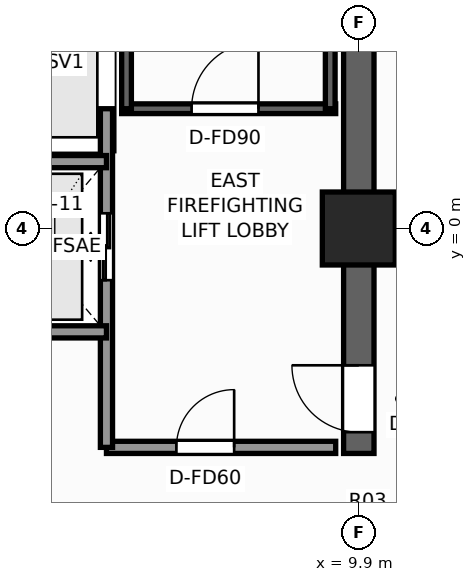
"""IFC4 building model, lengths in metres.
Left out: names, types, materials, properties, quantities, classifications, styles, units other than length and angle.
Written with IfcOpenShell. Run it as: python <this file> out.ifc"""

import sys

from ifc_helpers import new_model, si_unit, direction, frame, frame_2d, origin, origin_2d, place, context, subcontext, project, spatial, rectangle, extrude, element, fill, save


model = new_model("IFC4")
c1 = context("Model", 3, precision=1e-05, world=origin(), true_north=direction((0.0, 1.0)))
c2 = subcontext(c1, "Body", "Model", "MODEL_VIEW")
j1 = project(units=[si_unit("LENGTHUNIT", "METRE"), si_unit("PLANEANGLEUNIT", "RADIAN")], contexts=[c1])
p1 = place(None, origin())
s1 = spatial("IfcSite", under=j1, at=p1, CompositionType="ELEMENT")
p2 = place(p1, origin())
s2 = spatial("IfcBuilding", under=s1, at=p2, CompositionType="ELEMENT")
p3 = place(p2, frame((0.0, 0.0, 166.8)))
s3 = spatial("IfcBuildingStorey", under=s2, at=p3, CompositionType="ELEMENT", Elevation=166.8)
p4 = place(p3, frame((9.9, -3.7, 0.0), z_axis=(0.0, 0.0, 1.0), x_axis=(0.0, 1.0, 0.0)))
e1 = element("IfcWall", 1, at=p4, inside=s3, PredefinedType="SHEAR", context=c2, shape_type="SweptSolid", body=[
    extrude(rectangle(XDim=13.35, YDim=0.5, at=frame_2d((6.675, 0.0))), origin(), (0.0, 0.0, 1.0), 3.3),
])
p5 = place(p4, frame((0.35, 0.0, 0.0)))
e2 = element("IfcOpeningElement", 2, at=p5, cuts=e1, PredefinedType="OPENING", context=c2, shape_type="SweptSolid", body=[
    extrude(rectangle(XDim=1.1, YDim=2.2, at=frame_2d((0.55, 1.1))), frame((0.0, 0.26, 0.0), z_axis=(0.0, -1.0, 0.0), x_axis=(1.0, 0.0, 0.0)), (0.0, 0.0, 1.0), 0.52),
])
p6 = place(p3, frame((9.9, 0.0, 0.0), z_axis=(0.0, 0.0, 1.0), x_axis=(1.0, 0.0, 0.0)))
e3 = element("IfcColumn", 3, at=p6, inside=s3, PredefinedType="COLUMN", context=c2, shape_type="SweptSolid", body=[
    extrude(rectangle(XDim=1.2, YDim=1.2, at=origin_2d()), origin(), (0.0, 0.0, 1.0), 3.3),
])
p7 = place(p3, frame((6.0, 1.97, 0.0), z_axis=(0.0, 0.0, 1.0), x_axis=(1.0, 0.0, 0.0)))
e4 = element("IfcWall", 4, at=p7, inside=s3, PredefinedType="SHEAR", context=c2, shape_type="SweptSolid", body=[
    extrude(rectangle(XDim=3.52, YDim=0.16, at=frame_2d((1.76, 0.0))), origin(), (0.0, 0.0, 1.0), 3.3),
])
p8 = place(p7, frame((1.15, 0.0, 0.0)))
e5 = element("IfcOpeningElement", 5, at=p8, cuts=e4, PredefinedType="OPENING", context=c2, shape_type="SweptSolid", body=[
    extrude(rectangle(XDim=1.1, YDim=2.2, at=frame_2d((0.55, 1.1))), frame((0.0, 0.09, 0.0), z_axis=(0.0, -1.0, 0.0), x_axis=(1.0, 0.0, 0.0)), (0.0, 0.0, 1.0), 0.18),
])
for number, where, z_axis, x_axis in (
    (6, (6.08, 1.97, 0.0), (0.0, 0.0, 1.0), (0.0, 1.0, 0.0)),
    (7, (9.43, 1.97, 0.0), (0.0, 0.0, 1.0), (0.0, 1.0, 0.0)),
):
    element("IfcWall", number, at=place(p3, frame(where, z_axis=z_axis, x_axis=x_axis)), inside=s3, PredefinedType="SHEAR", context=c2, shape_type="SweptSolid", body=[
        extrude(rectangle(XDim=7.56, YDim=0.16, at=frame_2d((3.78, 0.0))), origin(), (0.0, 0.0, 1.0), 3.3),
    ])
p9 = place(p3, frame((5.75, -3.6, 0.0), z_axis=(0.0, 0.0, 1.0), x_axis=(1.0, 0.0, 0.0)))
e8 = element("IfcWall", 8, at=p9, inside=s3, PredefinedType="SOLIDWALL", context=c2, shape_type="SweptSolid", body=[
    extrude(rectangle(XDim=3.77, YDim=0.2, at=frame_2d((1.885, 0.0))), origin(), (0.0, 0.0, 1.0), 3.1),
])
p10 = place(p9, frame((1.15, 0.0, 0.0)))
e9 = element("IfcOpeningElement", 9, at=p10, cuts=e8, PredefinedType="OPENING", context=c2, shape_type="SweptSolid", body=[
    extrude(rectangle(XDim=0.95, YDim=2.06, at=frame_2d((0.475, 1.03))), frame((0.0, 0.11, 0.0), z_axis=(0.0, -1.0, 0.0), x_axis=(1.0, 0.0, 0.0)), (0.0, 0.0, 1.0), 0.22),
])
p11 = place(p3, frame((5.75, -3.6, 0.0), z_axis=(0.0, 0.0, 1.0), x_axis=(0.0, 1.0, 0.0)))
e10 = element("IfcWall", 10, at=p11, inside=s3, PredefinedType="SOLIDWALL", context=c2, shape_type="SweptSolid", body=[
    extrude(rectangle(XDim=5.57, YDim=0.2, at=frame_2d((2.785, 0.0))), origin(), (0.0, 0.0, 1.0), 2.735),
])
p12 = place(p11, frame((2.75, 0.0, 0.0)))
e11 = element("IfcOpeningElement", 11, at=p12, cuts=e10, PredefinedType="OPENING", context=c2, shape_type="SweptSolid", body=[
    extrude(rectangle(XDim=1.1, YDim=2.2, at=frame_2d((0.55, 1.1))), frame((0.0, 0.11, 0.0), z_axis=(0.0, -1.0, 0.0), x_axis=(1.0, 0.0, 0.0)), (0.0, 0.0, 1.0), 0.22),
])
for number, where, z_axis, x_axis in (
    (12, (3.35, -1.7, 0.0), (0.0, 0.0, 1.0), (1.0, 0.0, 0.0)),
    (13, (3.35, 1.1, 0.0), (0.0, 0.0, 1.0), (1.0, 0.0, 0.0)),
):
    element("IfcWall", number, at=place(p3, frame(where, z_axis=z_axis, x_axis=x_axis)), inside=s3, PredefinedType="SOLIDWALL", context=c2, shape_type="SweptSolid", body=[
        extrude(rectangle(XDim=2.4, YDim=0.2, at=frame_2d((1.2, 0.0))), origin(), (0.0, 0.0, 1.0), 3.1),
    ])
p13 = place(p8, origin())
e14 = element("IfcDoor", 14, at=p13, inside=s3, OperationType="SINGLE_SWING_RIGHT", PredefinedType="DOOR", context=c2, shape_type="SweptSolid", body=[
    extrude(rectangle(XDim=1.1, YDim=2.2, at=frame_2d((0.55, 1.1))), frame((0.0, 0.025, 0.0), z_axis=(0.0, -1.0, 0.0), x_axis=(1.0, 0.0, 0.0)), (0.0, 0.0, 1.0), 0.05),
])
fill(e5, e14)
p14 = place(p5, origin())
e15 = element("IfcDoor", 15, at=p14, inside=s3, OperationType="SINGLE_SWING_RIGHT", PredefinedType="DOOR", context=c2, shape_type="SweptSolid", body=[
    extrude(rectangle(XDim=1.1, YDim=2.2, at=frame_2d((0.55, 1.1))), frame((0.0, 0.025, 0.0), z_axis=(0.0, -1.0, 0.0), x_axis=(1.0, 0.0, 0.0)), (0.0, 0.0, 1.0), 0.05),
])
fill(e2, e15)
p15 = place(p12, origin())
e16 = element("IfcDoor", 16, at=p15, inside=s3, OperationType="DOUBLE_DOOR_SLIDING", PredefinedType="DOOR", context=c2, shape_type="SweptSolid", body=[
    extrude(rectangle(XDim=1.1, YDim=2.2, at=frame_2d((0.55, 1.1))), frame((0.0, 0.025, 0.0), z_axis=(0.0, -1.0, 0.0), x_axis=(1.0, 0.0, 0.0)), (0.0, 0.0, 1.0), 0.05),
])
fill(e11, e16)
p16 = place(p10, origin())
e17 = element("IfcDoor", 17, at=p16, inside=s3, OperationType="SINGLE_SWING_RIGHT", PredefinedType="DOOR", context=c2, shape_type="SweptSolid", body=[
    extrude(rectangle(XDim=0.95, YDim=2.06, at=frame_2d((0.475, 1.03))), frame((0.0, 0.025, 0.0), z_axis=(0.0, -1.0, 0.0), x_axis=(1.0, 0.0, 0.0)), (0.0, 0.0, 1.0), 0.05),
])
fill(e9, e17)
save(model, sys.argv[1])
